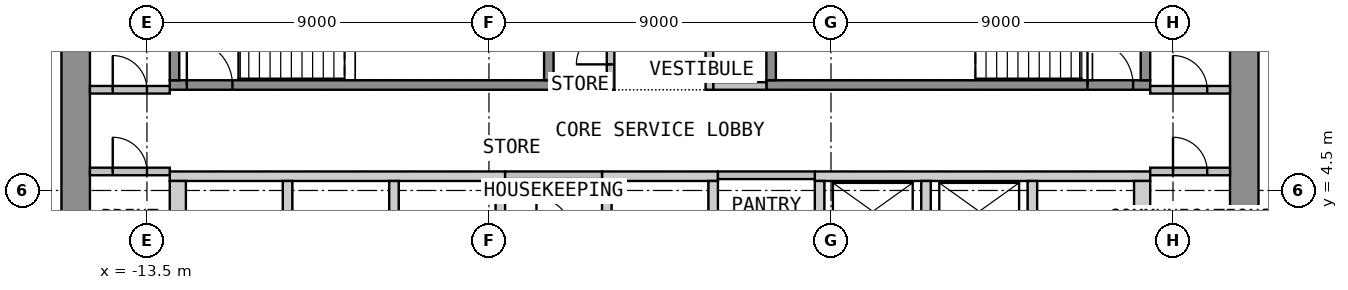
"""IFC4 building model, lengths in metres.
Left out: names, types, materials, properties, quantities, classifications, styles, units other than length and angle.
Written with IfcOpenShell. Run it as: python <this file> out.ifc"""

import sys

from ifc_helpers import new_model, si_unit, direction, frame, frame_2d, origin, place, context, subcontext, project, spatial, polyline, rectangle, outline, extrude, element, fill, save


model = new_model("IFC4")
c1 = context("Model", 3, precision=1e-05, world=origin(), true_north=direction((0.0, 1.0)))
c2 = subcontext(c1, "Body", "Model", "MODEL_VIEW")
j1 = project(units=[si_unit("LENGTHUNIT", "METRE"), si_unit("PLANEANGLEUNIT", "RADIAN")], contexts=[c1])
p1 = place(None, origin())
s1 = spatial("IfcSite", under=j1, at=p1, CompositionType="ELEMENT")
p2 = place(p1, origin())
s2 = spatial("IfcBuilding", under=s1, at=p2, CompositionType="ELEMENT")
p3 = place(p2, frame((0.0, 0.0, 132.6)))
s3 = spatial("IfcBuildingStorey", under=s2, at=p3, CompositionType="ELEMENT", Elevation=132.6)
p4 = place(p3, frame((-15.375, -12.75, 0.0), z_axis=(0.0, 0.0, 1.0), x_axis=(0.0, 1.0, 0.0)))
e1 = element("IfcWall", 1, at=p4, inside=s3, PredefinedType="SHEAR", context=c2, shape_type="SweptSolid", body=[
    extrude(rectangle(XDim=25.5, YDim=0.75, at=frame_2d((12.75, 0.0))), origin(), (0.0, 0.0, 1.0), 3.575),
])
p5 = place(p4, frame((11.55, 0.0, 0.0)))
e2 = element("IfcOpeningElement", 2, at=p5, cuts=e1, PredefinedType="OPENING", context=c2, shape_type="SweptSolid", body=[
    extrude(rectangle(XDim=2.4, YDim=2.1, at=frame_2d((1.2, 1.05))), frame((0.0, 0.385, 0.0), z_axis=(0.0, -1.0, 0.0), x_axis=(1.0, 0.0, 0.0)), (0.0, 0.0, 1.0), 0.77),
])
p6 = place(p3, frame((15.375, -12.75, 0.0), z_axis=(0.0, 0.0, 1.0), x_axis=(0.0, 1.0, 0.0)))
e3 = element("IfcWall", 3, at=p6, inside=s3, PredefinedType="SHEAR", context=c2, shape_type="SweptSolid", body=[
    extrude(rectangle(XDim=25.5, YDim=0.75, at=frame_2d((12.75, 0.0))), origin(), (0.0, 0.0, 1.0), 3.575),
])
p7 = place(p6, frame((11.55, 0.0, 0.0)))
e4 = element("IfcOpeningElement", 4, at=p7, cuts=e3, PredefinedType="OPENING", context=c2, shape_type="SweptSolid", body=[
    extrude(rectangle(XDim=2.4, YDim=2.1, at=frame_2d((1.2, 1.05))), frame((0.0, 0.385, 0.0), z_axis=(0.0, -1.0, 0.0), x_axis=(1.0, 0.0, 0.0)), (0.0, 0.0, 1.0), 0.77),
])
p8 = place(p3, origin())
e5 = element("IfcWall", 5, at=p8, inside=s3, PredefinedType="SHEAR", context=c2, shape_type="SweptSolid", body=[
    extrude(outline(polyline([(-12.9, 4.75), (-4.075, 4.75), (-4.075, 5.0), (-12.9, 5.0), (-12.9, 4.75)])), origin(), (0.0, 0.0, 1.0), 3.575),
])
p9 = place(p3, origin())
e6 = element("IfcWall", 6, at=p9, inside=s3, PredefinedType="SHEAR", context=c2, shape_type="SweptSolid", body=[
    extrude(outline(polyline([(-1.525, 4.75), (1.525, 4.75), (1.525, 5.0), (-1.525, 5.0), (-1.525, 4.75)])), origin(), (0.0, 0.0, 1.0), 3.575),
])
p10 = place(p3, origin())
e7 = element("IfcWall", 7, at=p10, inside=s3, PredefinedType="SHEAR", context=c2, shape_type="SweptSolid", body=[
    extrude(outline(polyline([(4.075, 4.75), (12.9, 4.75), (12.9, 5.0), (4.075, 5.0), (4.075, 4.75)])), origin(), (0.0, 0.0, 1.0), 3.575),
])
p11 = place(p3, origin())
e8 = element("IfcWall", 8, at=p11, inside=s3, PredefinedType="SHEAR", context=c2, shape_type="SweptSolid", body=[
    extrude(outline(polyline([(-12.9, 2.05), (-12.475, 2.05), (-12.475, 4.75), (-12.9, 4.75), (-12.9, 2.05)])), origin(), (0.0, 0.0, 1.0), 3.575),
])
p12 = place(p3, origin())
e9 = element("IfcWall", 9, at=p12, inside=s3, PredefinedType="SHEAR", context=c2, shape_type="SweptSolid", body=[
    extrude(outline(polyline([(-9.925, 2.05), (-9.675, 2.05), (-9.675, 4.75), (-9.925, 4.75), (-9.925, 2.05)])), origin(), (0.0, 0.0, 1.0), 3.575),
])
p13 = place(p3, origin())
e10 = element("IfcWall", 10, at=p13, inside=s3, PredefinedType="SHEAR", context=c2, shape_type="SweptSolid", body=[
    extrude(outline(polyline([(-7.125, 2.05), (-6.875, 2.05), (-6.875, 4.75), (-7.125, 4.75), (-7.125, 2.05)])), origin(), (0.0, 0.0, 1.0), 3.575),
])
p14 = place(p3, origin())
e11 = element("IfcWall", 11, at=p14, inside=s3, PredefinedType="SHEAR", context=c2, shape_type="SweptSolid", body=[
    extrude(outline(polyline([(-4.325, 2.05), (-4.075, 2.05), (-4.075, 4.75), (-4.325, 4.75), (-4.325, 2.05)])), origin(), (0.0, 0.0, 1.0), 3.575),
])
p15 = place(p3, origin())
e12 = element("IfcWall", 12, at=p15, inside=s3, PredefinedType="SHEAR", context=c2, shape_type="SweptSolid", body=[
    extrude(outline(polyline([(-1.525, 2.05), (-1.275, 2.05), (-1.275, 4.75), (-1.525, 4.75), (-1.525, 2.05)])), origin(), (0.0, 0.0, 1.0), 3.575),
])
p16 = place(p3, origin())
e13 = element("IfcWall", 13, at=p16, inside=s3, PredefinedType="SHEAR", context=c2, shape_type="SweptSolid", body=[
    extrude(outline(polyline([(1.275, 2.05), (1.525, 2.05), (1.525, 4.75), (1.275, 4.75), (1.275, 2.05)])), origin(), (0.0, 0.0, 1.0), 3.575),
])
p17 = place(p3, origin())
e14 = element("IfcWall", 14, at=p17, inside=s3, PredefinedType="SHEAR", context=c2, shape_type="SweptSolid", body=[
    extrude(outline(polyline([(9.675, 2.05), (9.925, 2.05), (9.925, 4.75), (9.675, 4.75), (9.675, 2.05)])), origin(), (0.0, 0.0, 1.0), 3.575),
])
p18 = place(p3, origin())
e15 = element("IfcWall", 15, at=p18, inside=s3, PredefinedType="SHEAR", context=c2, shape_type="SweptSolid", body=[
    extrude(outline(polyline([(12.475, 2.05), (12.9, 2.05), (12.9, 4.75), (12.475, 4.75), (12.475, 2.05)])), origin(), (0.0, 0.0, 1.0), 3.575),
])
p19 = place(p3, origin())
e16 = element("IfcWall", 16, at=p19, inside=s3, PredefinedType="SHEAR", context=c2, shape_type="SweptSolid", body=[
    extrude(outline(polyline([(4.075, 3.05), (4.325, 3.05), (4.325, 4.75), (4.075, 4.75), (4.075, 3.05)])), origin(), (0.0, 0.0, 1.0), 3.575),
])
p20 = place(p3, origin())
e17 = element("IfcWall", 17, at=p20, inside=s3, PredefinedType="SHEAR", context=c2, shape_type="SweptSolid", body=[
    extrude(outline(polyline([(6.875, 3.05), (7.125, 3.05), (7.125, 4.75), (6.875, 4.75), (6.875, 3.05)])), origin(), (0.0, 0.0, 1.0), 3.575),
])
p21 = place(p3, frame((-12.9, 7.275, 0.0), z_axis=(0.0, 0.0, 1.0), x_axis=(1.0, 0.0, 0.0)))
e18 = element("IfcWall", 18, at=p21, inside=s3, PredefinedType="SHEAR", context=c2, shape_type="SweptSolid", body=[
    extrude(rectangle(XDim=10.1, YDim=0.25, at=frame_2d((5.05, 0.0))), origin(), (0.0, 0.0, 1.0), 3.575),
])
p22 = place(p21, frame((0.45, 0.0, 0.0)))
e19 = element("IfcOpeningElement", 19, at=p22, cuts=e18, PredefinedType="OPENING", context=c2, shape_type="SweptSolid", body=[
    extrude(rectangle(XDim=1.2, YDim=2.1, at=frame_2d((0.6, 1.05))), frame((0.0, 0.135, 0.0), z_axis=(0.0, -1.0, 0.0), x_axis=(1.0, 0.0, 0.0)), (0.0, 0.0, 1.0), 0.27),
])
for number, where, z_axis, x_axis in (
    (20, (-12.775, 7.4, 0.0), (0.0, 0.0, 1.0), (0.0, 1.0, 0.0)),
    (21, (-2.925, 7.4, 0.0), (0.0, 0.0, 1.0), (0.0, 1.0, 0.0)),
):
    element("IfcWall", number, at=place(p3, frame(where, z_axis=z_axis, x_axis=x_axis)), inside=s3, PredefinedType="SHEAR", context=c2, shape_type="SweptSolid", body=[
        extrude(rectangle(XDim=3.25, YDim=0.25, at=frame_2d((1.625, 0.0))), origin(), (0.0, 0.0, 1.0), 3.575),
    ])
p23 = place(p3, frame((2.8, 7.275, 0.0), z_axis=(0.0, 0.0, 1.0), x_axis=(1.0, 0.0, 0.0)))
e22 = element("IfcWall", 22, at=p23, inside=s3, PredefinedType="SHEAR", context=c2, shape_type="SweptSolid", body=[
    extrude(rectangle(XDim=10.1, YDim=0.25, at=frame_2d((5.05, 0.0))), origin(), (0.0, 0.0, 1.0), 3.575),
])
p24 = place(p23, frame((8.45, 0.0, 0.0)))
e23 = element("IfcOpeningElement", 23, at=p24, cuts=e22, PredefinedType="OPENING", context=c2, shape_type="SweptSolid", body=[
    extrude(rectangle(XDim=1.2, YDim=2.1, at=frame_2d((0.6, 1.05))), frame((0.0, 0.135, 0.0), z_axis=(0.0, -1.0, 0.0), x_axis=(1.0, 0.0, 0.0)), (0.0, 0.0, 1.0), 0.27),
])
for number, where, z_axis, x_axis in (
    (24, (2.925, 7.4, 0.0), (0.0, 0.0, 1.0), (0.0, 1.0, 0.0)),
    (25, (12.775, 7.4, 0.0), (0.0, 0.0, 1.0), (0.0, 1.0, 0.0)),
):
    element("IfcWall", number, at=place(p3, frame(where, z_axis=z_axis, x_axis=x_axis)), inside=s3, PredefinedType="SHEAR", context=c2, shape_type="SweptSolid", body=[
        extrude(rectangle(XDim=3.25, YDim=0.25, at=frame_2d((1.625, 0.0))), origin(), (0.0, 0.0, 1.0), 3.575),
    ])
for number, where, z_axis, x_axis in (
    (26, (-2.8, 7.25, 0.0), (0.0, 0.0, 1.0), (1.0, 0.0, 0.0)),
    (27, (1.4, 7.25, 0.0), (0.0, 0.0, 1.0), (1.0, 0.0, 0.0)),
):
    element("IfcWall", number, at=place(p3, frame(where, z_axis=z_axis, x_axis=x_axis)), inside=s3, PredefinedType="PARTITIONING", context=c2, shape_type="SweptSolid", body=[
        extrude(rectangle(XDim=1.4, YDim=0.2, at=frame_2d((0.7, 0.0))), origin(), (0.0, 0.0, 1.0), 3.575),
    ])
p25 = place(p3, frame((-1.3, 7.15, 0.0), z_axis=(0.0, 0.0, 1.0), x_axis=(0.0, 1.0, 0.0)))
e28 = element("IfcWall", 28, at=p25, inside=s3, PredefinedType="PARTITIONING", context=c2, shape_type="SweptSolid", body=[
    extrude(rectangle(XDim=5.6, YDim=0.2, at=frame_2d((2.8, 0.0))), origin(), (0.0, 0.0, 1.0), 3.575),
])
p26 = place(p25, frame((0.668, 0.0, 0.0)))
e29 = element("IfcOpeningElement", 29, at=p26, cuts=e28, PredefinedType="OPENING", context=c2, shape_type="SweptSolid", body=[
    extrude(rectangle(XDim=0.9, YDim=2.1, at=frame_2d((0.45, 1.05))), frame((0.0, 0.11, 0.0), z_axis=(0.0, -1.0, 0.0), x_axis=(1.0, 0.0, 0.0)), (0.0, 0.0, 1.0), 0.22),
])
p27 = place(p25, frame((2.477, 0.0, 0.0)))
e30 = element("IfcOpeningElement", 30, at=p27, cuts=e28, PredefinedType="OPENING", context=c2, shape_type="SweptSolid", body=[
    extrude(rectangle(XDim=0.9, YDim=2.1, at=frame_2d((0.45, 1.05))), frame((0.0, 0.11, 0.0), z_axis=(0.0, -1.0, 0.0), x_axis=(1.0, 0.0, 0.0)), (0.0, 0.0, 1.0), 0.22),
])
p28 = place(p25, frame((4.259, 0.0, 0.0)))
e31 = element("IfcOpeningElement", 31, at=p28, cuts=e28, PredefinedType="OPENING", context=c2, shape_type="SweptSolid", body=[
    extrude(rectangle(XDim=0.9, YDim=2.1, at=frame_2d((0.45, 1.05))), frame((0.0, 0.11, 0.0), z_axis=(0.0, -1.0, 0.0), x_axis=(1.0, 0.0, 0.0)), (0.0, 0.0, 1.0), 0.22),
])
p29 = place(p3, frame((1.3, 7.15, 0.0), z_axis=(0.0, 0.0, 1.0), x_axis=(0.0, 1.0, 0.0)))
e32 = element("IfcWall", 32, at=p29, inside=s3, PredefinedType="PARTITIONING", context=c2, shape_type="SweptSolid", body=[
    extrude(rectangle(XDim=5.6, YDim=0.2, at=frame_2d((2.8, 0.0))), origin(), (0.0, 0.0, 1.0), 3.575),
])
p30 = place(p29, frame((1.1, 0.0, 0.0)))
e33 = element("IfcOpeningElement", 33, at=p30, cuts=e32, PredefinedType="OPENING", context=c2, shape_type="SweptSolid", body=[
    extrude(rectangle(XDim=0.9, YDim=2.1, at=frame_2d((0.45, 1.05))), frame((0.0, 0.11, 0.0), z_axis=(0.0, -1.0, 0.0), x_axis=(1.0, 0.0, 0.0)), (0.0, 0.0, 1.0), 0.22),
])
p31 = place(p29, frame((3.8, 0.0, 0.0)))
e34 = element("IfcOpeningElement", 34, at=p31, cuts=e32, PredefinedType="OPENING", context=c2, shape_type="SweptSolid", body=[
    extrude(rectangle(XDim=0.9, YDim=2.1, at=frame_2d((0.45, 1.05))), frame((0.0, 0.11, 0.0), z_axis=(0.0, -1.0, 0.0), x_axis=(1.0, 0.0, 0.0)), (0.0, 0.0, 1.0), 0.22),
])
p32 = place(p3, frame((-15.0, 7.15, 0.0), z_axis=(0.0, 0.0, 1.0), x_axis=(1.0, 0.0, 0.0)))
e35 = element("IfcWall", 35, at=p32, inside=s3, PredefinedType="PARTITIONING", context=c2, shape_type="SweptSolid", body=[
    extrude(rectangle(XDim=2.1, YDim=0.2, at=frame_2d((1.05, 0.0))), origin(), (0.0, 0.0, 1.0), 3.575),
])
p33 = place(p32, frame((0.6, 0.0, 0.0)))
e36 = element("IfcOpeningElement", 36, at=p33, cuts=e35, PredefinedType="OPENING", context=c2, shape_type="SweptSolid", body=[
    extrude(rectangle(XDim=0.9, YDim=2.1, at=frame_2d((0.45, 1.05))), frame((0.0, 0.11, 0.0), z_axis=(0.0, -1.0, 0.0), x_axis=(1.0, 0.0, 0.0)), (0.0, 0.0, 1.0), 0.22),
])
p34 = place(p3, frame((-15.0, 5.0, 0.0), z_axis=(0.0, 0.0, 1.0), x_axis=(1.0, 0.0, 0.0)))
e37 = element("IfcWall", 37, at=p34, inside=s3, PredefinedType="PARTITIONING", context=c2, shape_type="SweptSolid", body=[
    extrude(rectangle(XDim=2.1, YDim=0.2, at=frame_2d((1.05, 0.0))), origin(), (0.0, 0.0, 1.0), 3.575),
])
p35 = place(p34, frame((0.6, 0.0, 0.0)))
e38 = element("IfcOpeningElement", 38, at=p35, cuts=e37, PredefinedType="OPENING", context=c2, shape_type="SweptSolid", body=[
    extrude(rectangle(XDim=0.9, YDim=2.1, at=frame_2d((0.45, 1.05))), frame((0.0, 0.11, 0.0), z_axis=(0.0, -1.0, 0.0), x_axis=(1.0, 0.0, 0.0)), (0.0, 0.0, 1.0), 0.22),
])
p36 = place(p3, frame((12.9, 7.15, 0.0), z_axis=(0.0, 0.0, 1.0), x_axis=(1.0, 0.0, 0.0)))
e39 = element("IfcWall", 39, at=p36, inside=s3, PredefinedType="PARTITIONING", context=c2, shape_type="SweptSolid", body=[
    extrude(rectangle(XDim=2.1, YDim=0.2, at=frame_2d((1.05, 0.0))), origin(), (0.0, 0.0, 1.0), 3.575),
])
p37 = place(p36, frame((0.6, 0.0, 0.0)))
e40 = element("IfcOpeningElement", 40, at=p37, cuts=e39, PredefinedType="OPENING", context=c2, shape_type="SweptSolid", body=[
    extrude(rectangle(XDim=0.9, YDim=2.1, at=frame_2d((0.45, 1.05))), frame((0.0, 0.11, 0.0), z_axis=(0.0, -1.0, 0.0), x_axis=(1.0, 0.0, 0.0)), (0.0, 0.0, 1.0), 0.22),
])
p38 = place(p3, frame((12.9, 5.0, 0.0), z_axis=(0.0, 0.0, 1.0), x_axis=(1.0, 0.0, 0.0)))
e41 = element("IfcWall", 41, at=p38, inside=s3, PredefinedType="PARTITIONING", context=c2, shape_type="SweptSolid", body=[
    extrude(rectangle(XDim=2.1, YDim=0.2, at=frame_2d((1.05, 0.0))), origin(), (0.0, 0.0, 1.0), 3.575),
])
p39 = place(p38, frame((0.6, 0.0, 0.0)))
e42 = element("IfcOpeningElement", 42, at=p39, cuts=e41, PredefinedType="OPENING", context=c2, shape_type="SweptSolid", body=[
    extrude(rectangle(XDim=0.9, YDim=2.1, at=frame_2d((0.45, 1.05))), frame((0.0, 0.11, 0.0), z_axis=(0.0, -1.0, 0.0), x_axis=(1.0, 0.0, 0.0)), (0.0, 0.0, 1.0), 0.22),
])
for number, where, z_axis, x_axis in (
    (43, (-4.075, 4.9, 0.0), (0.0, 0.0, 1.0), (1.0, 0.0, 0.0)),
    (44, (1.525, 4.9, 0.0), (0.0, 0.0, 1.0), (1.0, 0.0, 0.0)),
):
    element("IfcWall", number, at=place(p3, frame(where, z_axis=z_axis, x_axis=x_axis)), inside=s3, PredefinedType="PARTITIONING", context=c2, shape_type="SweptSolid", body=[
        extrude(rectangle(XDim=2.55, YDim=0.2, at=frame_2d((1.275, 0.0))), origin(), (0.0, 0.0, 1.0), 3.575),
    ])
p40 = place(p22, origin())
e45 = element("IfcDoor", 45, at=p40, inside=s3, OperationType="SINGLE_SWING_LEFT", PredefinedType="DOOR", context=c2, shape_type="SweptSolid", body=[
    extrude(rectangle(XDim=1.2, YDim=2.1, at=frame_2d((0.6, 1.05))), frame((0.0, 0.025, 0.0), z_axis=(0.0, -1.0, 0.0), x_axis=(1.0, 0.0, 0.0)), (0.0, 0.0, 1.0), 0.05),
])
fill(e19, e45)
p41 = place(p24, origin())
e46 = element("IfcDoor", 46, at=p41, inside=s3, OperationType="SINGLE_SWING_LEFT", PredefinedType="DOOR", context=c2, shape_type="SweptSolid", body=[
    extrude(rectangle(XDim=1.2, YDim=2.1, at=frame_2d((0.6, 1.05))), frame((0.0, 0.025, 0.0), z_axis=(0.0, -1.0, 0.0), x_axis=(1.0, 0.0, 0.0)), (0.0, 0.0, 1.0), 0.05),
])
fill(e23, e46)
p42 = place(p26, origin())
e47 = element("IfcDoor", 47, at=p42, inside=s3, OperationType="SINGLE_SWING_LEFT", PredefinedType="DOOR", context=c2, shape_type="SweptSolid", body=[
    extrude(rectangle(XDim=0.9, YDim=2.1, at=frame_2d((0.45, 1.05))), frame((0.0, 0.025, 0.0), z_axis=(0.0, -1.0, 0.0), x_axis=(1.0, 0.0, 0.0)), (0.0, 0.0, 1.0), 0.05),
])
fill(e29, e47)
p43 = place(p33, origin())
e48 = element("IfcDoor", 48, at=p43, inside=s3, OperationType="SINGLE_SWING_LEFT", PredefinedType="DOOR", context=c2, shape_type="SweptSolid", body=[
    extrude(rectangle(XDim=0.9, YDim=2.1, at=frame_2d((0.45, 1.05))), frame((0.0, 0.025, 0.0), z_axis=(0.0, -1.0, 0.0), x_axis=(1.0, 0.0, 0.0)), (0.0, 0.0, 1.0), 0.05),
])
fill(e36, e48)
p44 = place(p35, origin())
e49 = element("IfcDoor", 49, at=p44, inside=s3, OperationType="SINGLE_SWING_LEFT", PredefinedType="DOOR", context=c2, shape_type="SweptSolid", body=[
    extrude(rectangle(XDim=0.9, YDim=2.1, at=frame_2d((0.45, 1.05))), frame((0.0, 0.025, 0.0), z_axis=(0.0, -1.0, 0.0), x_axis=(1.0, 0.0, 0.0)), (0.0, 0.0, 1.0), 0.05),
])
fill(e38, e49)
p45 = place(p37, origin())
e50 = element("IfcDoor", 50, at=p45, inside=s3, OperationType="SINGLE_SWING_LEFT", PredefinedType="DOOR", context=c2, shape_type="SweptSolid", body=[
    extrude(rectangle(XDim=0.9, YDim=2.1, at=frame_2d((0.45, 1.05))), frame((0.0, 0.025, 0.0), z_axis=(0.0, -1.0, 0.0), x_axis=(1.0, 0.0, 0.0)), (0.0, 0.0, 1.0), 0.05),
])
fill(e40, e50)
p46 = place(p39, origin())
e51 = element("IfcDoor", 51, at=p46, inside=s3, OperationType="SINGLE_SWING_LEFT", PredefinedType="DOOR", context=c2, shape_type="SweptSolid", body=[
    extrude(rectangle(XDim=0.9, YDim=2.1, at=frame_2d((0.45, 1.05))), frame((0.0, 0.025, 0.0), z_axis=(0.0, -1.0, 0.0), x_axis=(1.0, 0.0, 0.0)), (0.0, 0.0, 1.0), 0.05),
])
fill(e42, e51)
save(model, sys.argv[1])
